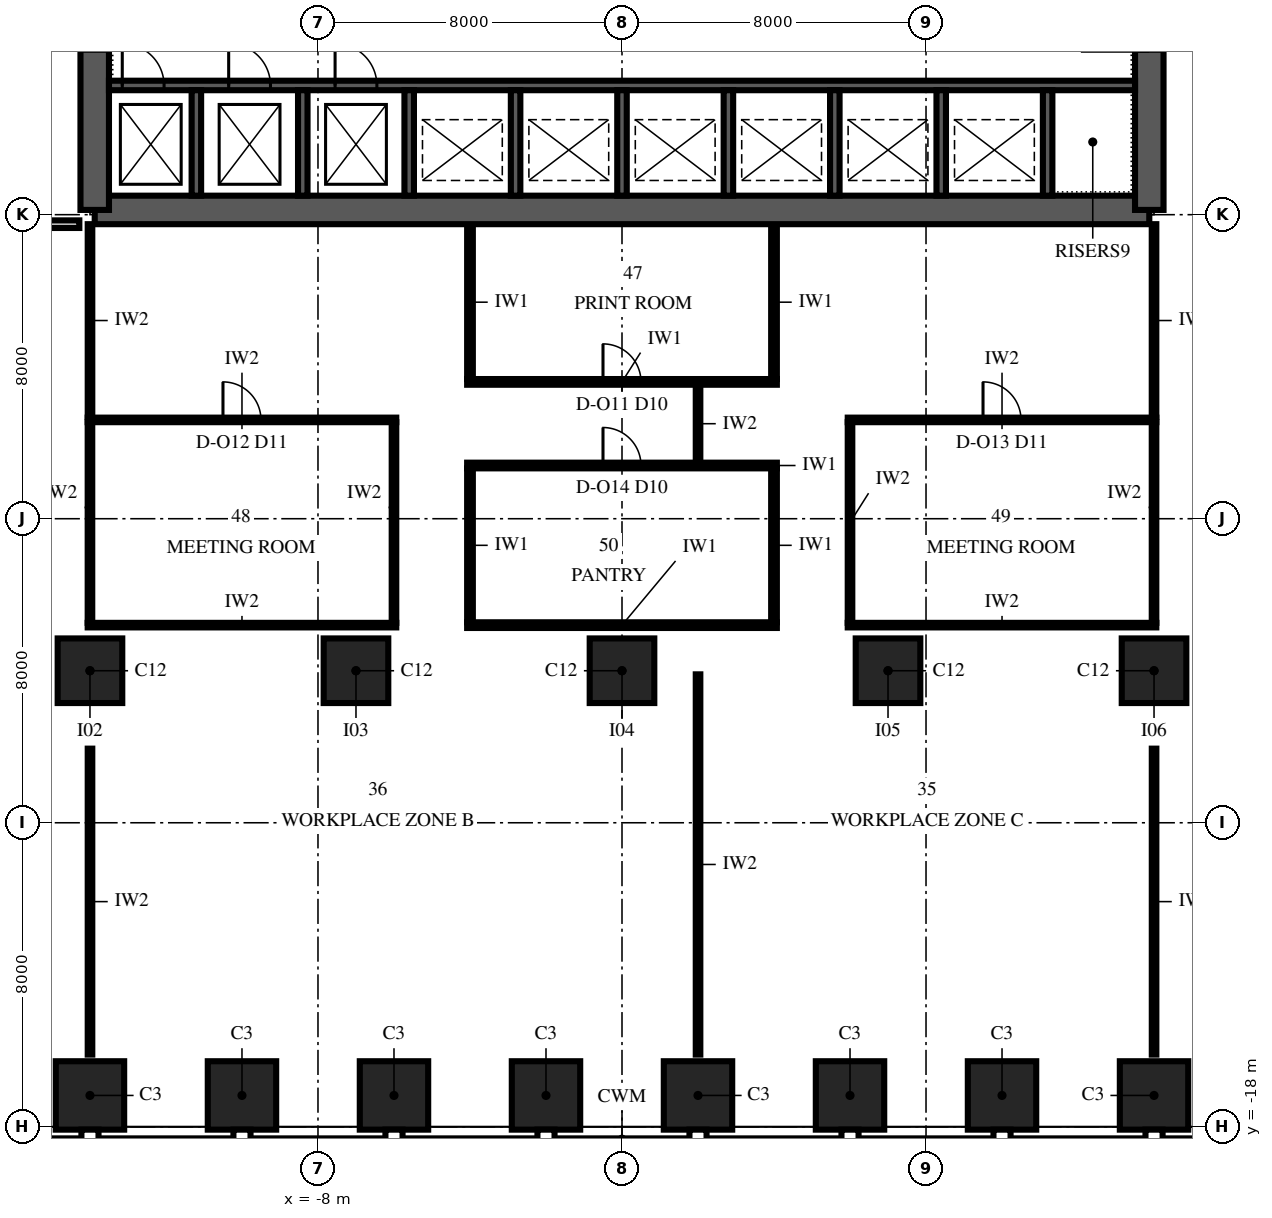
"""IFC4 building model, lengths in metres.
Left out: names, types, materials, properties, quantities, classifications, styles, units other than length and angle.
Written with IfcOpenShell. Run it as: python <this file> out.ifc"""

import sys

from ifc_helpers import new_model, si_unit, direction, frame, frame_2d, origin, origin_2d, place, context, subcontext, project, spatial, polyline, rectangle, outline, extrude, element, fill, save


model = new_model("IFC4")
c1 = context("Model", 3, precision=1e-05, world=origin(), true_north=direction((0.0, 1.0)))
c2 = subcontext(c1, "Body", "Model", "MODEL_VIEW")
j1 = project(units=[si_unit("LENGTHUNIT", "METRE"), si_unit("PLANEANGLEUNIT", "RADIAN")], contexts=[c1])
p1 = place(None, origin())
s1 = spatial("IfcSite", under=j1, at=p1, CompositionType="ELEMENT")
p2 = place(p1, origin())
s2 = spatial("IfcBuilding", under=s1, at=p2, CompositionType="ELEMENT")
p3 = place(p2, frame((0.0, 0.0, 139.0)))
s3 = spatial("IfcBuildingStorey", under=s2, at=p3, CompositionType="ELEMENT", Elevation=139.0)
for number, where, z_axis, x_axis in (
    (1, (-14.0, -17.175, 0.0), (0.0, 0.0, 1.0), (1.0, 0.0, 0.0)),
    (2, (-10.0, -17.175, 0.0), (0.0, 0.0, 1.0), (1.0, 0.0, 0.0)),
    (3, (-6.0, -17.175, 0.0), (0.0, 0.0, 1.0), (1.0, 0.0, 0.0)),
    (4, (-2.0, -17.175, 0.0), (0.0, 0.0, 1.0), (1.0, 0.0, 0.0)),
    (5, (2.0, -17.175, 0.0), (0.0, 0.0, 1.0), (1.0, 0.0, 0.0)),
    (6, (6.0, -17.175, 0.0), (0.0, 0.0, 1.0), (1.0, 0.0, 0.0)),
    (7, (10.0, -17.175, 0.0), (0.0, 0.0, 1.0), (1.0, 0.0, 0.0)),
    (8, (14.0, -17.175, 0.0), (0.0, 0.0, 1.0), (1.0, 0.0, 0.0)),
):
    element("IfcColumn", number, at=place(p3, frame(where, z_axis=z_axis, x_axis=x_axis)), inside=s3, PredefinedType="COLUMN", context=c2, shape_type="SweptSolid", body=[
        extrude(rectangle(XDim=1.8, YDim=1.8, at=origin_2d()), origin(), (0.0, 0.0, 1.0), 4.0),
    ])
for number, where, z_axis, x_axis in (
    (9, (-14.0, -6.0, 0.0), (0.0, 0.0, 1.0), (1.0, 0.0, 0.0)),
    (10, (-7.0, -6.0, 0.0), (0.0, 0.0, 1.0), (1.0, 0.0, 0.0)),
    (11, (0.0, -6.0, 0.0), (0.0, 0.0, 1.0), (1.0, 0.0, 0.0)),
    (12, (7.0, -6.0, 0.0), (0.0, 0.0, 1.0), (1.0, 0.0, 0.0)),
    (13, (14.0, -6.0, 0.0), (0.0, 0.0, 1.0), (1.0, 0.0, 0.0)),
):
    element("IfcColumn", number, at=place(p3, frame(where, z_axis=z_axis, x_axis=x_axis)), inside=s3, PredefinedType="COLUMN", context=c2, shape_type="SweptSolid", body=[
        extrude(rectangle(XDim=1.7, YDim=1.7, at=origin_2d()), origin(), (0.0, 0.0, 1.0), 4.0),
    ])
p4 = place(p3, frame((-13.875, 6.125, 0.0), z_axis=(0.0, 0.0, 1.0), x_axis=(1.0, 0.0, 0.0)))
e14 = element("IfcWall", 14, at=p4, inside=s3, PredefinedType="SHEAR", context=c2, shape_type="SweptSolid", body=[
    extrude(rectangle(XDim=27.75, YDim=0.75, at=frame_2d((13.875, 0.0))), origin(), (0.0, 0.0, 1.0), 4.0),
])
p5 = place(p3, frame((13.875, 6.125, 0.0), z_axis=(0.0, 0.0, 1.0), x_axis=(0.0, 1.0, 0.0)))
e15 = element("IfcWall", 15, at=p5, inside=s3, PredefinedType="SHEAR", context=c2, shape_type="SweptSolid", body=[
    extrude(outline(polyline([(0.0, -0.375), (17.75, -0.375), (17.75, 0.0), (17.375, 0.0), (17.375, 0.375), (0.375, 0.375), (0.375, 0.0), (0.0, 0.0), (0.0, -0.375)])), origin(), (0.0, 0.0, 1.0), 4.0),
])
p6 = place(p5, frame((4.175, 0.0, 0.0)))
e16 = element("IfcOpeningElement", 16, at=p6, cuts=e15, PredefinedType="OPENING", context=c2, shape_type="SweptSolid", body=[
    extrude(rectangle(XDim=1.8, YDim=2.4, at=frame_2d((0.9, 1.2))), frame((0.0, 0.39, 0.0), z_axis=(0.0, -1.0, 0.0), x_axis=(1.0, 0.0, 0.0)), (0.0, 0.0, 1.0), 0.78),
])
p7 = place(p3, frame((-13.875, 23.875, 0.0), z_axis=(0.0, 0.0, 1.0), x_axis=(0.0, -1.0, 0.0)))
e17 = element("IfcWall", 17, at=p7, inside=s3, PredefinedType="SHEAR", context=c2, shape_type="SweptSolid", body=[
    extrude(outline(polyline([(0.0, -0.375), (17.75, -0.375), (17.75, 0.0), (17.375, 0.0), (17.375, 0.375), (0.375, 0.375), (0.375, 0.0), (0.0, 0.0), (0.0, -0.375)])), origin(), (0.0, 0.0, 1.0), 4.0),
])
p8 = place(p7, frame((11.775, 0.0, 0.0)))
e18 = element("IfcOpeningElement", 18, at=p8, cuts=e17, PredefinedType="OPENING", context=c2, shape_type="SweptSolid", body=[
    extrude(rectangle(XDim=1.8, YDim=2.4, at=frame_2d((0.9, 1.2))), frame((0.0, 0.39, 0.0), z_axis=(0.0, -1.0, 0.0), x_axis=(1.0, 0.0, 0.0)), (0.0, 0.0, 1.0), 0.78),
])
p9 = place(p3, frame((-13.5, 9.4, 0.0), z_axis=(0.0, 0.0, 1.0), x_axis=(1.0, 0.0, 0.0)))
e19 = element("IfcWall", 19, at=p9, inside=s3, PredefinedType="SHEAR", context=c2, shape_type="SweptSolid", body=[
    extrude(rectangle(XDim=27.0, YDim=0.25, at=frame_2d((13.5, 0.0))), origin(), (0.0, 0.0, 1.0), 4.0),
])
p10 = place(p9, frame((0.35, 0.0, 0.0)))
e20 = element("IfcOpeningElement", 20, at=p10, cuts=e19, PredefinedType="OPENING", context=c2, shape_type="SweptSolid", body=[
    extrude(rectangle(XDim=1.1, YDim=2.1, at=frame_2d((0.55, 1.05))), frame((0.0, 0.14, 0.0), z_axis=(0.0, -1.0, 0.0), x_axis=(1.0, 0.0, 0.0)), (0.0, 0.0, 1.0), 0.28),
])
p11 = place(p9, frame((3.15, 0.0, 0.0)))
e21 = element("IfcOpeningElement", 21, at=p11, cuts=e19, PredefinedType="OPENING", context=c2, shape_type="SweptSolid", body=[
    extrude(rectangle(XDim=1.1, YDim=2.1, at=frame_2d((0.55, 1.05))), frame((0.0, 0.14, 0.0), z_axis=(0.0, -1.0, 0.0), x_axis=(1.0, 0.0, 0.0)), (0.0, 0.0, 1.0), 0.28),
])
p12 = place(p9, frame((5.95, 0.0, 0.0)))
e22 = element("IfcOpeningElement", 22, at=p12, cuts=e19, PredefinedType="OPENING", context=c2, shape_type="SweptSolid", body=[
    extrude(rectangle(XDim=1.1, YDim=2.1, at=frame_2d((0.55, 1.05))), frame((0.0, 0.14, 0.0), z_axis=(0.0, -1.0, 0.0), x_axis=(1.0, 0.0, 0.0)), (0.0, 0.0, 1.0), 0.28),
])
for number, where, z_axis, x_axis in (
    (23, (-11.2, 6.5, 0.0), (0.0, 0.0, 1.0), (0.0, 1.0, 0.0)),
    (24, (-8.4, 6.5, 0.0), (0.0, 0.0, 1.0), (0.0, 1.0, 0.0)),
    (25, (-5.6, 6.5, 0.0), (0.0, 0.0, 1.0), (0.0, 1.0, 0.0)),
    (26, (-2.8, 6.5, 0.0), (0.0, 0.0, 1.0), (0.0, 1.0, 0.0)),
    (27, (0.0, 6.5, 0.0), (0.0, 0.0, 1.0), (0.0, 1.0, 0.0)),
    (28, (2.8, 6.5, 0.0), (0.0, 0.0, 1.0), (0.0, 1.0, 0.0)),
    (29, (5.6, 6.5, 0.0), (0.0, 0.0, 1.0), (0.0, 1.0, 0.0)),
    (30, (8.4, 6.5, 0.0), (0.0, 0.0, 1.0), (0.0, 1.0, 0.0)),
    (31, (11.2, 6.5, 0.0), (0.0, 0.0, 1.0), (0.0, 1.0, 0.0)),
):
    element("IfcWall", number, at=place(p3, frame(where, z_axis=z_axis, x_axis=x_axis)), inside=s3, PredefinedType="SHEAR", context=c2, shape_type="SweptSolid", body=[
        extrude(rectangle(XDim=2.775, YDim=0.25, at=frame_2d((1.387, 0.0))), origin(), (0.0, 0.0, 1.0), 4.0),
    ])
p13 = place(p3, frame((-14.06, -4.8, 0.0), z_axis=(0.0, 0.0, 1.0), x_axis=(1.0, 0.0, 0.0)))
e32 = element("IfcWall", 32, at=p13, inside=s3, PredefinedType="PARTITIONING", context=c2, shape_type="SweptSolid", body=[
    extrude(rectangle(XDim=8.12, YDim=0.12, at=frame_2d((4.06, 0.0))), origin(), (0.0, 0.0, 1.0), 3.25),
])
p14 = place(p3, frame((-4.075, -4.8, 0.0), z_axis=(0.0, 0.0, 1.0), x_axis=(1.0, 0.0, 0.0)))
e33 = element("IfcWall", 33, at=p14, inside=s3, PredefinedType="PARTITIONING", context=c2, shape_type="SweptSolid", body=[
    extrude(rectangle(XDim=8.15, YDim=0.15, at=frame_2d((4.075, 0.0))), origin(), (0.0, 0.0, 1.0), 3.25),
])
p15 = place(p3, frame((5.94, -4.8, 0.0), z_axis=(0.0, 0.0, 1.0), x_axis=(1.0, 0.0, 0.0)))
e34 = element("IfcWall", 34, at=p15, inside=s3, PredefinedType="PARTITIONING", context=c2, shape_type="SweptSolid", body=[
    extrude(rectangle(XDim=8.12, YDim=0.12, at=frame_2d((4.06, 0.0))), origin(), (0.0, 0.0, 1.0), 3.25),
])
p16 = place(p3, frame((-4.075, -0.6, 0.0), z_axis=(0.0, 0.0, 1.0), x_axis=(1.0, 0.0, 0.0)))
e35 = element("IfcWall", 35, at=p16, inside=s3, PredefinedType="PARTITIONING", context=c2, shape_type="SweptSolid", body=[
    extrude(rectangle(XDim=8.15, YDim=0.15, at=frame_2d((4.075, 0.0))), origin(), (0.0, 0.0, 1.0), 3.25),
])
p17 = place(p16, frame((3.575, 0.0, 0.0)))
e36 = element("IfcOpeningElement", 36, at=p17, cuts=e35, PredefinedType="OPENING", context=c2, shape_type="SweptSolid", body=[
    extrude(rectangle(XDim=1.0, YDim=2.3, at=frame_2d((0.5, 1.15))), frame((0.0, 0.09, 0.0), z_axis=(0.0, -1.0, 0.0), x_axis=(1.0, 0.0, 0.0)), (0.0, 0.0, 1.0), 0.18),
])
p18 = place(p3, frame((-14.06, 0.6, 0.0), z_axis=(0.0, 0.0, 1.0), x_axis=(1.0, 0.0, 0.0)))
e37 = element("IfcWall", 37, at=p18, inside=s3, PredefinedType="PARTITIONING", context=c2, shape_type="SweptSolid", body=[
    extrude(rectangle(XDim=8.12, YDim=0.12, at=frame_2d((4.06, 0.0))), origin(), (0.0, 0.0, 1.0), 3.25),
])
p19 = place(p18, frame((3.56, 0.0, 0.0)))
e38 = element("IfcOpeningElement", 38, at=p19, cuts=e37, PredefinedType="OPENING", context=c2, shape_type="SweptSolid", body=[
    extrude(rectangle(XDim=1.0, YDim=2.4, at=frame_2d((0.5, 1.2))), frame((0.0, 0.075, 0.0), z_axis=(0.0, -1.0, 0.0), x_axis=(1.0, 0.0, 0.0)), (0.0, 0.0, 1.0), 0.15),
])
p20 = place(p3, frame((5.94, 0.6, 0.0), z_axis=(0.0, 0.0, 1.0), x_axis=(1.0, 0.0, 0.0)))
e39 = element("IfcWall", 39, at=p20, inside=s3, PredefinedType="PARTITIONING", context=c2, shape_type="SweptSolid", body=[
    extrude(rectangle(XDim=8.12, YDim=0.12, at=frame_2d((4.06, 0.0))), origin(), (0.0, 0.0, 1.0), 3.25),
])
p21 = place(p20, frame((3.56, 0.0, 0.0)))
e40 = element("IfcOpeningElement", 40, at=p21, cuts=e39, PredefinedType="OPENING", context=c2, shape_type="SweptSolid", body=[
    extrude(rectangle(XDim=1.0, YDim=2.4, at=frame_2d((0.5, 1.2))), frame((0.0, 0.075, 0.0), z_axis=(0.0, -1.0, 0.0), x_axis=(1.0, 0.0, 0.0)), (0.0, 0.0, 1.0), 0.15),
])
p22 = place(p3, frame((-4.075, 1.6, 0.0), z_axis=(0.0, 0.0, 1.0), x_axis=(1.0, 0.0, 0.0)))
e41 = element("IfcWall", 41, at=p22, inside=s3, PredefinedType="PARTITIONING", context=c2, shape_type="SweptSolid", body=[
    extrude(rectangle(XDim=8.15, YDim=0.15, at=frame_2d((4.075, 0.0))), origin(), (0.0, 0.0, 1.0), 3.25),
])
p23 = place(p22, frame((3.575, 0.0, 0.0)))
e42 = element("IfcOpeningElement", 42, at=p23, cuts=e41, PredefinedType="OPENING", context=c2, shape_type="SweptSolid", body=[
    extrude(rectangle(XDim=1.0, YDim=2.3, at=frame_2d((0.5, 1.15))), frame((0.0, 0.09, 0.0), z_axis=(0.0, -1.0, 0.0), x_axis=(1.0, 0.0, 0.0)), (0.0, 0.0, 1.0), 0.18),
])
p24 = place(p3, frame((-16.3, 5.75, 0.0), z_axis=(0.0, 0.0, 1.0), x_axis=(1.0, 0.0, 0.0)))
e43 = element("IfcWall", 43, at=p24, inside=s3, PredefinedType="PARTITIONING", context=c2, shape_type="SweptSolid", body=[
    extrude(rectangle(XDim=2.02, YDim=0.2, at=frame_2d((1.01, 0.0))), origin(), (0.0, 0.0, 1.0), 3.85),
])
for number, where, z_axis, x_axis in (
    (44, (-14.0, -4.74, 0.0), (0.0, 0.0, 1.0), (0.0, 1.0, 0.0)),
    (45, (-6.0, -4.74, 0.0), (0.0, 0.0, 1.0), (0.0, 1.0, 0.0)),
):
    element("IfcWall", number, at=place(p3, frame(where, z_axis=z_axis, x_axis=x_axis)), inside=s3, PredefinedType="PARTITIONING", context=c2, shape_type="SweptSolid", body=[
        extrude(rectangle(XDim=5.28, YDim=0.12, at=frame_2d((2.64, 0.0))), origin(), (0.0, 0.0, 1.0), 3.25),
    ])
p25 = place(p3, frame((-4.0, -4.725, 0.0), z_axis=(0.0, 0.0, 1.0), x_axis=(0.0, 1.0, 0.0)))
e46 = element("IfcWall", 46, at=p25, inside=s3, PredefinedType="PARTITIONING", context=c2, shape_type="SweptSolid", body=[
    extrude(rectangle(XDim=4.05, YDim=0.15, at=frame_2d((2.025, 0.0))), origin(), (0.0, 0.0, 1.0), 3.85),
])
p26 = place(p3, frame((-4.0, 1.675, 0.0), z_axis=(0.0, 0.0, 1.0), x_axis=(0.0, 1.0, 0.0)))
e47 = element("IfcWall", 47, at=p26, inside=s3, PredefinedType="PARTITIONING", context=c2, shape_type="SweptSolid", body=[
    extrude(rectangle(XDim=4.045, YDim=0.15, at=frame_2d((2.022, 0.0))), origin(), (0.0, 0.0, 1.0), 3.85),
])
p27 = place(p3, frame((4.0, -4.725, 0.0), z_axis=(0.0, 0.0, 1.0), x_axis=(0.0, 1.0, 0.0)))
e48 = element("IfcWall", 48, at=p27, inside=s3, PredefinedType="PARTITIONING", context=c2, shape_type="SweptSolid", body=[
    extrude(rectangle(XDim=4.05, YDim=0.15, at=frame_2d((2.025, 0.0))), origin(), (0.0, 0.0, 1.0), 3.85),
])
p28 = place(p3, frame((4.0, 1.675, 0.0), z_axis=(0.0, 0.0, 1.0), x_axis=(0.0, 1.0, 0.0)))
e49 = element("IfcWall", 49, at=p28, inside=s3, PredefinedType="PARTITIONING", context=c2, shape_type="SweptSolid", body=[
    extrude(rectangle(XDim=4.045, YDim=0.15, at=frame_2d((2.022, 0.0))), origin(), (0.0, 0.0, 1.0), 3.85),
])
for number, where, z_axis, x_axis in (
    (50, (6.0, -4.74, 0.0), (0.0, 0.0, 1.0), (0.0, 1.0, 0.0)),
    (51, (14.0, -4.74, 0.0), (0.0, 0.0, 1.0), (0.0, 1.0, 0.0)),
):
    element("IfcWall", number, at=place(p3, frame(where, z_axis=z_axis, x_axis=x_axis)), inside=s3, PredefinedType="PARTITIONING", context=c2, shape_type="SweptSolid", body=[
        extrude(rectangle(XDim=5.28, YDim=0.12, at=frame_2d((2.64, 0.0))), origin(), (0.0, 0.0, 1.0), 3.25),
    ])
p29 = place(p3, frame((-13.999, -16.1, 0.0), z_axis=(0.0, 0.0, 1.0), x_axis=(0.0, 1.0, 0.0)))
e52 = element("IfcWall", 52, at=p29, inside=s3, PredefinedType="PARTITIONING", context=c2, shape_type="SweptSolid", body=[
    extrude(rectangle(XDim=8.05, YDim=0.12, at=frame_2d((4.025, 0.0))), origin(), (0.0, 0.0, 1.0), 3.25),
])
p30 = place(p3, frame((-13.999, 0.68, 0.0), z_axis=(0.0, 0.0, 1.0), x_axis=(0.0, 1.0, 0.0)))
e53 = element("IfcWall", 53, at=p30, inside=s3, PredefinedType="PARTITIONING", context=c2, shape_type="SweptSolid", body=[
    extrude(rectangle(XDim=5.07, YDim=0.12, at=frame_2d((2.535, 0.0))), origin(), (0.0, 0.0, 1.0), 3.25),
])
p31 = place(p3, frame((2.001, -16.1, 0.0), z_axis=(0.0, 0.0, 1.0), x_axis=(0.0, 1.0, 0.0)))
e54 = element("IfcWall", 54, at=p31, inside=s3, PredefinedType="PARTITIONING", context=c2, shape_type="SweptSolid", body=[
    extrude(rectangle(XDim=10.005, YDim=0.12, at=frame_2d((5.002, 0.0))), origin(), (0.0, 0.0, 1.0), 2.842),
])
p32 = place(p3, frame((2.001, -0.505, 0.0), z_axis=(0.0, 0.0, 1.0), x_axis=(0.0, 1.0, 0.0)))
e55 = element("IfcWall", 55, at=p32, inside=s3, PredefinedType="PARTITIONING", context=c2, shape_type="SweptSolid", body=[
    extrude(rectangle(XDim=2.01, YDim=0.12, at=frame_2d((1.005, 0.0))), origin(), (0.0, 0.0, 1.0), 3.85),
])
p33 = place(p3, frame((14.001, -16.1, 0.0), z_axis=(0.0, 0.0, 1.0), x_axis=(0.0, 1.0, 0.0)))
e56 = element("IfcWall", 56, at=p33, inside=s3, PredefinedType="PARTITIONING", context=c2, shape_type="SweptSolid", body=[
    extrude(rectangle(XDim=8.05, YDim=0.12, at=frame_2d((4.025, 0.0))), origin(), (0.0, 0.0, 1.0), 3.25),
])
p34 = place(p3, frame((14.0, 0.68, 0.0), z_axis=(0.0, 0.0, 1.0), x_axis=(0.0, 1.0, 0.0)))
e57 = element("IfcWall", 57, at=p34, inside=s3, PredefinedType="PARTITIONING", context=c2, shape_type="SweptSolid", body=[
    extrude(rectangle(XDim=5.07, YDim=0.12, at=frame_2d((2.535, 0.0))), origin(), (0.0, 0.0, 1.0), 3.25),
])
p35 = place(p10, origin())
e58 = element("IfcDoor", 58, at=p35, inside=s3, OperationType="SLIDING_TO_LEFT", PredefinedType="DOOR", context=c2, shape_type="SweptSolid", body=[
    extrude(rectangle(XDim=1.1, YDim=2.1, at=frame_2d((0.55, 1.05))), frame((0.0, 0.125, 0.0), z_axis=(0.0, -1.0, 0.0), x_axis=(1.0, 0.0, 0.0)), (0.0, 0.0, 1.0), 0.25),
])
fill(e20, e58)
p36 = place(p11, origin())
e59 = element("IfcDoor", 59, at=p36, inside=s3, OperationType="SLIDING_TO_LEFT", PredefinedType="DOOR", context=c2, shape_type="SweptSolid", body=[
    extrude(rectangle(XDim=1.1, YDim=2.1, at=frame_2d((0.55, 1.05))), frame((0.0, 0.125, 0.0), z_axis=(0.0, -1.0, 0.0), x_axis=(1.0, 0.0, 0.0)), (0.0, 0.0, 1.0), 0.25),
])
fill(e21, e59)
p37 = place(p12, origin())
e60 = element("IfcDoor", 60, at=p37, inside=s3, OperationType="SLIDING_TO_LEFT", PredefinedType="DOOR", context=c2, shape_type="SweptSolid", body=[
    extrude(rectangle(XDim=1.1, YDim=2.1, at=frame_2d((0.55, 1.05))), frame((0.0, 0.125, 0.0), z_axis=(0.0, -1.0, 0.0), x_axis=(1.0, 0.0, 0.0)), (0.0, 0.0, 1.0), 0.25),
])
fill(e22, e60)
p38 = place(p23, origin())
e61 = element("IfcDoor", 61, at=p38, inside=s3, OperationType="SINGLE_SWING_LEFT", PredefinedType="DOOR", context=c2, shape_type="SweptSolid", body=[
    extrude(rectangle(XDim=1.0, YDim=2.3, at=frame_2d((0.5, 1.15))), frame((0.0, 0.075, 0.0), z_axis=(0.0, -1.0, 0.0), x_axis=(1.0, 0.0, 0.0)), (0.0, 0.0, 1.0), 0.149),
])
fill(e42, e61)
p39 = place(p19, origin())
e62 = element("IfcDoor", 62, at=p39, inside=s3, OperationType="SINGLE_SWING_RIGHT", PredefinedType="DOOR", context=c2, shape_type="SweptSolid", body=[
    extrude(rectangle(XDim=1.0, YDim=2.4, at=frame_2d((0.5, 1.2))), frame((0.0, 0.06, 0.0), z_axis=(0.0, -1.0, 0.0), x_axis=(1.0, 0.0, 0.0)), (0.0, 0.0, 1.0), 0.12),
])
fill(e38, e62)
p40 = place(p21, origin())
e63 = element("IfcDoor", 63, at=p40, inside=s3, OperationType="SINGLE_SWING_RIGHT", PredefinedType="DOOR", context=c2, shape_type="SweptSolid", body=[
    extrude(rectangle(XDim=1.0, YDim=2.4, at=frame_2d((0.5, 1.2))), frame((0.0, 0.06, 0.0), z_axis=(0.0, -1.0, 0.0), x_axis=(1.0, 0.0, 0.0)), (0.0, 0.0, 1.0), 0.12),
])
fill(e40, e63)
p41 = place(p17, origin())
e64 = element("IfcDoor", 64, at=p41, inside=s3, OperationType="SINGLE_SWING_LEFT", PredefinedType="DOOR", context=c2, shape_type="SweptSolid", body=[
    extrude(rectangle(XDim=1.0, YDim=2.3, at=frame_2d((0.5, 1.15))), frame((0.0, 0.075, 0.0), z_axis=(0.0, -1.0, 0.0), x_axis=(1.0, 0.0, 0.0)), (0.0, 0.0, 1.0), 0.149),
])
fill(e36, e64)
save(model, sys.argv[1])
